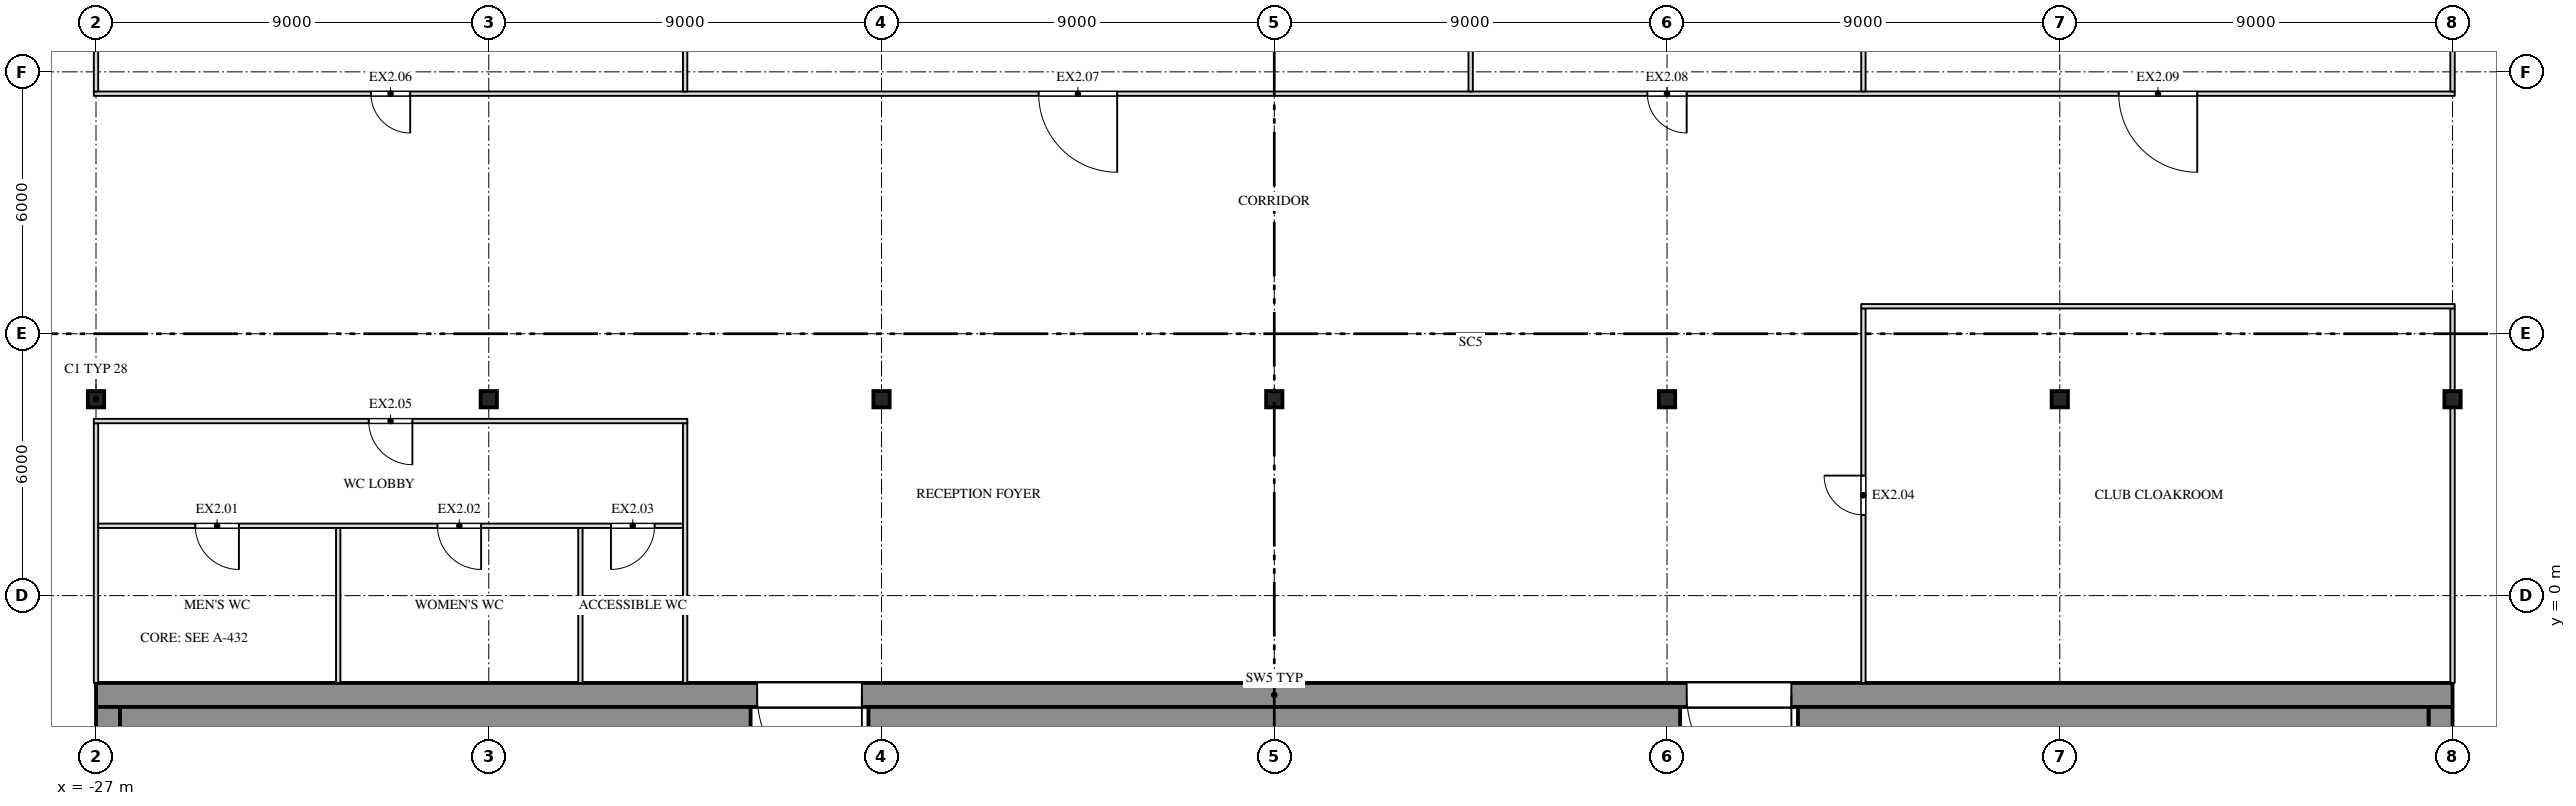
"""IFC4 building model, lengths in metres.
Left out: names, types, materials, properties, quantities, classifications, styles, units other than length and angle.
Written with IfcOpenShell. Run it as: python <this file> out.ifc"""

import sys

from ifc_helpers import new_model, si_unit, direction, frame, frame_2d, origin, origin_2d, place, context, subcontext, project, spatial, rectangle, i_section, extrude, element, fill, save


model = new_model("IFC4")
c1 = context("Model", 3, precision=1e-05, world=origin(), true_north=direction((0.0, 1.0)))
c2 = subcontext(c1, "Body", "Model", "MODEL_VIEW")
j1 = project(units=[si_unit("LENGTHUNIT", "METRE"), si_unit("PLANEANGLEUNIT", "RADIAN")], contexts=[c1])
p1 = place(None, origin())
s1 = spatial("IfcSite", under=j1, at=p1, CompositionType="ELEMENT")
p2 = place(p1, origin())
s2 = spatial("IfcBuilding", under=s1, at=p2, CompositionType="ELEMENT")
p3 = place(p2, frame((0.0, 0.0, 276.5)))
s3 = spatial("IfcBuildingStorey", under=s2, at=p3, CompositionType="ELEMENT", Elevation=276.5)
for number, where, z_axis, x_axis in (
    (1, (-27.0, 4.5, 0.0), (0.0, 0.0, 1.0), (1.0, 0.0, 0.0)),
    (2, (-18.0, 4.5, 0.0), (0.0, 0.0, 1.0), (1.0, 0.0, 0.0)),
    (3, (-9.0, 4.5, 0.0), (0.0, 0.0, 1.0), (1.0, 0.0, 0.0)),
    (4, (0.0, 4.5, 0.0), (0.0, 0.0, 1.0), (1.0, 0.0, 0.0)),
    (5, (9.0, 4.5, 0.0), (0.0, 0.0, 1.0), (1.0, 0.0, 0.0)),
    (6, (18.0, 4.5, 0.0), (0.0, 0.0, 1.0), (1.0, 0.0, 0.0)),
    (7, (27.0, 4.5, 0.0), (0.0, 0.0, 1.0), (1.0, 0.0, 0.0)),
):
    element("IfcColumn", number, at=place(p3, frame(where, z_axis=z_axis, x_axis=x_axis)), inside=s3, PredefinedType="COLUMN", context=c2, shape_type="SweptSolid", body=[
        extrude(i_section(OverallWidth=0.373, OverallDepth=0.373, WebThickness=0.016, FlangeThickness=0.026, at=origin_2d()), origin(), (0.0, 0.0, 1.0), 4.0),
    ])
p4 = place(p3, frame((-27.0, -2.275, 0.0), z_axis=(0.0, 0.0, 1.0), x_axis=(1.0, 0.0, 0.0)))
e8 = element("IfcWall", 8, at=p4, inside=s3, PredefinedType="SHEAR", context=c2, shape_type="SweptSolid", body=[
    extrude(rectangle(XDim=54.0, YDim=0.55, at=frame_2d((27.0, 0.0))), origin(), (0.0, 0.0, 1.0), 3.78),
])
p5 = place(p4, frame((15.15, 0.0, 0.0)))
e9 = element("IfcOpeningElement", 9, at=p5, cuts=e8, PredefinedType="OPENING", context=c2, shape_type="SweptSolid", body=[
    extrude(rectangle(XDim=2.4, YDim=2.1, at=frame_2d((1.2, 1.05))), frame((0.0, 0.287, 0.0), z_axis=(0.0, -1.0, 0.0), x_axis=(1.0, 0.0, 0.0)), (0.0, 0.0, 1.0), 0.574),
])
p6 = place(p4, frame((36.45, 0.0, 0.0)))
e10 = element("IfcOpeningElement", 10, at=p6, cuts=e8, PredefinedType="OPENING", context=c2, shape_type="SweptSolid", body=[
    extrude(rectangle(XDim=2.4, YDim=2.1, at=frame_2d((1.2, 1.05))), frame((0.0, 0.287, 0.0), z_axis=(0.0, -1.0, 0.0), x_axis=(1.0, 0.0, 0.0)), (0.0, 0.0, 1.0), 0.574),
])
p7 = place(p3, frame((-26.725, -13.45, 0.0), z_axis=(0.0, 0.0, 1.0), x_axis=(0.0, 1.0, 0.0)))
e11 = element("IfcWall", 11, at=p7, inside=s3, PredefinedType="SHEAR", context=c2, shape_type="SweptSolid", body=[
    extrude(rectangle(XDim=10.9, YDim=0.55, at=frame_2d((5.45, 0.0))), origin(), (0.0, 0.0, 1.0), 3.78),
])
p8 = place(p7, frame((4.662, 0.0, 0.0)))
e12 = element("IfcOpeningElement", 12, at=p8, cuts=e11, PredefinedType="OPENING", context=c2, shape_type="SweptSolid", body=[
    extrude(rectangle(XDim=2.4, YDim=2.1, at=frame_2d((1.2, 1.05))), frame((0.0, 0.287, 0.0), z_axis=(0.0, -1.0, 0.0), x_axis=(1.0, 0.0, 0.0)), (0.0, 0.0, 1.0), 0.574),
])
p9 = place(p3, frame((26.725, -13.45, 0.0), z_axis=(0.0, 0.0, 1.0), x_axis=(0.0, 1.0, 0.0)))
e13 = element("IfcWall", 13, at=p9, inside=s3, PredefinedType="SHEAR", context=c2, shape_type="SweptSolid", body=[
    extrude(rectangle(XDim=10.9, YDim=0.55, at=frame_2d((5.45, 0.0))), origin(), (0.0, 0.0, 1.0), 3.78),
])
p10 = place(p9, frame((4.662, 0.0, 0.0)))
e14 = element("IfcOpeningElement", 14, at=p10, cuts=e13, PredefinedType="OPENING", context=c2, shape_type="SweptSolid", body=[
    extrude(rectangle(XDim=2.4, YDim=2.1, at=frame_2d((1.2, 1.05))), frame((0.0, 0.287, 0.0), z_axis=(0.0, -1.0, 0.0), x_axis=(1.0, 0.0, 0.0)), (0.0, 0.0, 1.0), 0.574),
])
p11 = place(p3, frame((-26.45, -2.875, 0.0), z_axis=(0.0, 0.0, 1.0), x_axis=(1.0, 0.0, 0.0)))
e15 = element("IfcWall", 15, at=p11, inside=s3, PredefinedType="SHEAR", context=c2, shape_type="SweptSolid", body=[
    extrude(rectangle(XDim=14.45, YDim=0.65, at=frame_2d((7.225, 0.0))), origin(), (0.0, 0.0, 1.0), 3.78),
])
p12 = place(p3, frame((-9.3, -2.875, 0.0), z_axis=(0.0, 0.0, 1.0), x_axis=(1.0, 0.0, 0.0)))
e16 = element("IfcWall", 16, at=p12, inside=s3, PredefinedType="SHEAR", context=c2, shape_type="SweptSolid", body=[
    extrude(rectangle(XDim=18.6, YDim=0.65, at=frame_2d((9.3, 0.0))), origin(), (0.0, 0.0, 1.0), 3.78),
])
p13 = place(p3, frame((12.0, -2.875, 0.0), z_axis=(0.0, 0.0, 1.0), x_axis=(1.0, 0.0, 0.0)))
e17 = element("IfcWall", 17, at=p13, inside=s3, PredefinedType="SHEAR", context=c2, shape_type="SweptSolid", body=[
    extrude(rectangle(XDim=14.45, YDim=0.65, at=frame_2d((7.225, 0.0))), origin(), (0.0, 0.0, 1.0), 3.78),
])
p14 = place(p3, frame((-27.0, -2.0, 0.0), z_axis=(0.0, 0.0, 1.0), x_axis=(0.0, 1.0, 0.0)))
e18 = element("IfcWall", 18, at=p14, inside=s3, PredefinedType="PARTITIONING", context=c2, shape_type="SweptSolid", body=[
    extrude(rectangle(XDim=5.95, YDim=0.1, at=frame_2d((2.975, 0.0))), origin(), (0.0, 0.0, 1.0), 3.247),
])
for number, where, z_axis, x_axis in (
    (19, (-21.45, -2.0, 0.0), (0.0, 0.0, 1.0), (0.0, 1.0, 0.0)),
    (20, (-15.9, -2.0, 0.0), (0.0, 0.0, 1.0), (0.0, 1.0, 0.0)),
):
    element("IfcWall", number, at=place(p3, frame(where, z_axis=z_axis, x_axis=x_axis)), inside=s3, PredefinedType="PARTITIONING", context=c2, shape_type="SweptSolid", body=[
        extrude(rectangle(XDim=3.55, YDim=0.1, at=frame_2d((1.775, 0.0))), origin(), (0.0, 0.0, 1.0), 3.78),
    ])
p15 = place(p3, frame((-13.5, -2.0, 0.0), z_axis=(0.0, 0.0, 1.0), x_axis=(0.0, 1.0, 0.0)))
e21 = element("IfcWall", 21, at=p15, inside=s3, PredefinedType="PARTITIONING", context=c2, shape_type="SweptSolid", body=[
    extrude(rectangle(XDim=5.95, YDim=0.1, at=frame_2d((2.975, 0.0))), origin(), (0.0, 0.0, 1.0), 3.247),
])
p16 = place(p3, frame((13.5, -2.0, 0.0), z_axis=(0.0, 0.0, 1.0), x_axis=(0.0, 1.0, 0.0)))
e22 = element("IfcWall", 22, at=p16, inside=s3, PredefinedType="PARTITIONING", context=c2, shape_type="SweptSolid", body=[
    extrude(rectangle(XDim=8.58, YDim=0.1, at=frame_2d((4.29, 0.0))), origin(), (0.0, 0.0, 1.0), 3.247),
])
p17 = place(p16, frame((3.85, 0.0, 0.0)))
e23 = element("IfcOpeningElement", 23, at=p17, cuts=e22, PredefinedType="OPENING", context=c2, shape_type="SweptSolid", body=[
    extrude(rectangle(XDim=0.9, YDim=2.1, at=frame_2d((0.45, 1.05))), frame((0.0, 0.062, 0.0), z_axis=(0.0, -1.0, 0.0), x_axis=(1.0, 0.0, 0.0)), (0.0, 0.0, 1.0), 0.124),
])
p18 = place(p3, frame((27.0, -2.0, 0.0), z_axis=(0.0, 0.0, 1.0), x_axis=(0.0, 1.0, 0.0)))
e24 = element("IfcWall", 24, at=p18, inside=s3, PredefinedType="PARTITIONING", context=c2, shape_type="SweptSolid", body=[
    extrude(rectangle(XDim=6.313, YDim=0.1, at=frame_2d((3.157, 0.0))), origin(), (0.0, 0.0, 1.0), 3.247),
])
p19 = place(p3, frame((27.0, 4.687, 0.0), z_axis=(0.0, 0.0, 1.0), x_axis=(0.0, 1.0, 0.0)))
e25 = element("IfcWall", 25, at=p19, inside=s3, PredefinedType="PARTITIONING", context=c2, shape_type="SweptSolid", body=[
    extrude(rectangle(XDim=1.893, YDim=0.1, at=frame_2d((0.947, 0.0))), origin(), (0.0, 0.0, 1.0), 3.247),
])
p20 = place(p3, frame((-26.95, 1.6, 0.0), z_axis=(0.0, 0.0, 1.0), x_axis=(1.0, 0.0, 0.0)))
e26 = element("IfcWall", 26, at=p20, inside=s3, PredefinedType="PARTITIONING", context=c2, shape_type="SweptSolid", body=[
    extrude(rectangle(XDim=13.4, YDim=0.1, at=frame_2d((6.7, 0.0))), origin(), (0.0, 0.0, 1.0), 3.78),
])
p21 = place(p20, frame((2.225, 0.0, 0.0)))
e27 = element("IfcOpeningElement", 27, at=p21, cuts=e26, PredefinedType="OPENING", context=c2, shape_type="SweptSolid", body=[
    extrude(rectangle(XDim=1.0, YDim=2.1, at=frame_2d((0.5, 1.05))), frame((0.0, 0.062, 0.0), z_axis=(0.0, -1.0, 0.0), x_axis=(1.0, 0.0, 0.0)), (0.0, 0.0, 1.0), 0.124),
])
p22 = place(p20, frame((7.775, 0.0, 0.0)))
e28 = element("IfcOpeningElement", 28, at=p22, cuts=e26, PredefinedType="OPENING", context=c2, shape_type="SweptSolid", body=[
    extrude(rectangle(XDim=1.0, YDim=2.1, at=frame_2d((0.5, 1.05))), frame((0.0, 0.062, 0.0), z_axis=(0.0, -1.0, 0.0), x_axis=(1.0, 0.0, 0.0)), (0.0, 0.0, 1.0), 0.124),
])
p23 = place(p20, frame((11.75, 0.0, 0.0)))
e29 = element("IfcOpeningElement", 29, at=p23, cuts=e26, PredefinedType="OPENING", context=c2, shape_type="SweptSolid", body=[
    extrude(rectangle(XDim=1.0, YDim=2.1, at=frame_2d((0.5, 1.05))), frame((0.0, 0.062, 0.0), z_axis=(0.0, -1.0, 0.0), x_axis=(1.0, 0.0, 0.0)), (0.0, 0.0, 1.0), 0.124),
])
p24 = place(p3, frame((-27.05, 4.0, 0.0), z_axis=(0.0, 0.0, 1.0), x_axis=(1.0, 0.0, 0.0)))
e30 = element("IfcWall", 30, at=p24, inside=s3, PredefinedType="PARTITIONING", context=c2, shape_type="SweptSolid", body=[
    extrude(rectangle(XDim=13.6, YDim=0.1, at=frame_2d((6.8, 0.0))), origin(), (0.0, 0.0, 1.0), 3.78),
])
p25 = place(p24, frame((6.3, 0.0, 0.0)))
e31 = element("IfcOpeningElement", 31, at=p25, cuts=e30, PredefinedType="OPENING", context=c2, shape_type="SweptSolid", body=[
    extrude(rectangle(XDim=1.0, YDim=2.1, at=frame_2d((0.5, 1.05))), frame((0.0, 0.062, 0.0), z_axis=(0.0, -1.0, 0.0), x_axis=(1.0, 0.0, 0.0)), (0.0, 0.0, 1.0), 0.124),
])
p26 = place(p3, frame((13.45, 6.63, 0.0), z_axis=(0.0, 0.0, 1.0), x_axis=(1.0, 0.0, 0.0)))
e32 = element("IfcWall", 32, at=p26, inside=s3, PredefinedType="PARTITIONING", context=c2, shape_type="SweptSolid", body=[
    extrude(rectangle(XDim=13.6, YDim=0.1, at=frame_2d((6.8, 0.0))), origin(), (0.0, 0.0, 1.0), 3.78),
])
p27 = place(p3, frame((-27.05, 11.5, 0.0), z_axis=(0.0, 0.0, 1.0), x_axis=(1.0, 0.0, 0.0)))
e33 = element("IfcWall", 33, at=p27, inside=s3, PredefinedType="PARTITIONING", context=c2, shape_type="SweptSolid", body=[
    extrude(rectangle(XDim=54.1, YDim=0.1, at=frame_2d((27.05, 0.0))), origin(), (0.0, 0.0, 1.0), 3.78),
])
p28 = place(p27, frame((6.35, 0.0, 0.0)))
e34 = element("IfcOpeningElement", 34, at=p28, cuts=e33, PredefinedType="OPENING", context=c2, shape_type="SweptSolid", body=[
    extrude(rectangle(XDim=0.9, YDim=2.1, at=frame_2d((0.45, 1.05))), frame((0.0, 0.062, 0.0), z_axis=(0.0, -1.0, 0.0), x_axis=(1.0, 0.0, 0.0)), (0.0, 0.0, 1.0), 0.124),
])
p29 = place(p27, frame((21.65, 0.0, 0.0)))
e35 = element("IfcOpeningElement", 35, at=p29, cuts=e33, PredefinedType="OPENING", context=c2, shape_type="SweptSolid", body=[
    extrude(rectangle(XDim=1.8, YDim=2.1, at=frame_2d((0.9, 1.05))), frame((0.0, 0.062, 0.0), z_axis=(0.0, -1.0, 0.0), x_axis=(1.0, 0.0, 0.0)), (0.0, 0.0, 1.0), 0.124),
])
p30 = place(p27, frame((35.6, 0.0, 0.0)))
e36 = element("IfcOpeningElement", 36, at=p30, cuts=e33, PredefinedType="OPENING", context=c2, shape_type="SweptSolid", body=[
    extrude(rectangle(XDim=0.9, YDim=2.1, at=frame_2d((0.45, 1.05))), frame((0.0, 0.062, 0.0), z_axis=(0.0, -1.0, 0.0), x_axis=(1.0, 0.0, 0.0)), (0.0, 0.0, 1.0), 0.124),
])
p31 = place(p27, frame((46.4, 0.0, 0.0)))
e37 = element("IfcOpeningElement", 37, at=p31, cuts=e33, PredefinedType="OPENING", context=c2, shape_type="SweptSolid", body=[
    extrude(rectangle(XDim=1.8, YDim=2.1, at=frame_2d((0.9, 1.05))), frame((0.0, 0.062, 0.0), z_axis=(0.0, -1.0, 0.0), x_axis=(1.0, 0.0, 0.0)), (0.0, 0.0, 1.0), 0.124),
])
p32 = place(p3, frame((-27.0, 11.55, 0.0), z_axis=(0.0, 0.0, 1.0), x_axis=(0.0, 1.0, 0.0)))
e38 = element("IfcWall", 38, at=p32, inside=s3, PredefinedType="PARTITIONING", context=c2, shape_type="SweptSolid", body=[
    extrude(rectangle(XDim=2.263, YDim=0.1, at=frame_2d((1.132, 0.0))), origin(), (0.0, 0.0, 1.0), 3.247),
])
p33 = place(p3, frame((-13.5, 11.55, 0.0), z_axis=(0.0, 0.0, 1.0), x_axis=(0.0, 1.0, 0.0)))
e39 = element("IfcWall", 39, at=p33, inside=s3, PredefinedType="PARTITIONING", context=c2, shape_type="SweptSolid", body=[
    extrude(rectangle(XDim=9.64, YDim=0.1, at=frame_2d((4.82, 0.0))), origin(), (0.0, 0.0, 1.0), 3.247),
])
p34 = place(p33, frame((4.4, 0.0, 0.0)))
e40 = element("IfcOpeningElement", 40, at=p34, cuts=e39, PredefinedType="OPENING", context=c2, shape_type="SweptSolid", body=[
    extrude(rectangle(XDim=0.8, YDim=2.1, at=frame_2d((0.4, 1.05))), frame((0.0, 0.062, 0.0), z_axis=(0.0, -1.0, 0.0), x_axis=(1.0, 0.0, 0.0)), (0.0, 0.0, 1.0), 0.124),
])
for number, where, z_axis, x_axis in (
    (41, (4.5, 11.55, 0.0), (0.0, 0.0, 1.0), (0.0, 1.0, 0.0)),
    (42, (13.5, 11.55, 0.0), (0.0, 0.0, 1.0), (0.0, 1.0, 0.0)),
):
    element("IfcWall", number, at=place(p3, frame(where, z_axis=z_axis, x_axis=x_axis)), inside=s3, PredefinedType="PARTITIONING", context=c2, shape_type="SweptSolid", body=[
        extrude(rectangle(XDim=9.64, YDim=0.1, at=frame_2d((4.82, 0.0))), origin(), (0.0, 0.0, 1.0), 3.247),
    ])
p35 = place(p3, frame((27.0, 11.55, 0.0), z_axis=(0.0, 0.0, 1.0), x_axis=(0.0, 1.0, 0.0)))
e43 = element("IfcWall", 43, at=p35, inside=s3, PredefinedType="PARTITIONING", context=c2, shape_type="SweptSolid", body=[
    extrude(rectangle(XDim=2.263, YDim=0.1, at=frame_2d((1.132, 0.0))), origin(), (0.0, 0.0, 1.0), 3.247),
])
p36 = place(p21, origin())
e44 = element("IfcDoor", 44, at=p36, inside=s3, OperationType="SINGLE_SWING_LEFT", PredefinedType="DOOR", context=c2, shape_type="SweptSolid", body=[
    extrude(rectangle(XDim=1.0, YDim=2.1, at=frame_2d((0.5, 1.05))), frame((0.0, 0.025, 0.0), z_axis=(0.0, -1.0, 0.0), x_axis=(1.0, 0.0, 0.0)), (0.0, 0.0, 1.0), 0.05),
])
fill(e27, e44)
p37 = place(p22, origin())
e45 = element("IfcDoor", 45, at=p37, inside=s3, OperationType="SINGLE_SWING_LEFT", PredefinedType="DOOR", context=c2, shape_type="SweptSolid", body=[
    extrude(rectangle(XDim=1.0, YDim=2.1, at=frame_2d((0.5, 1.05))), frame((0.0, 0.025, 0.0), z_axis=(0.0, -1.0, 0.0), x_axis=(1.0, 0.0, 0.0)), (0.0, 0.0, 1.0), 0.05),
])
fill(e28, e45)
p38 = place(p23, origin())
e46 = element("IfcDoor", 46, at=p38, inside=s3, OperationType="SINGLE_SWING_RIGHT", PredefinedType="DOOR", context=c2, shape_type="SweptSolid", body=[
    extrude(rectangle(XDim=1.0, YDim=2.1, at=frame_2d((0.5, 1.05))), frame((0.0, 0.025, 0.0), z_axis=(0.0, -1.0, 0.0), x_axis=(1.0, 0.0, 0.0)), (0.0, 0.0, 1.0), 0.05),
])
fill(e29, e46)
p39 = place(p17, origin())
e47 = element("IfcDoor", 47, at=p39, inside=s3, OperationType="SINGLE_SWING_RIGHT", PredefinedType="DOOR", context=c2, shape_type="SweptSolid", body=[
    extrude(rectangle(XDim=0.9, YDim=2.1, at=frame_2d((0.45, 1.05))), frame((0.0, 0.025, 0.0), z_axis=(0.0, -1.0, 0.0), x_axis=(1.0, 0.0, 0.0)), (0.0, 0.0, 1.0), 0.05),
])
fill(e23, e47)
p40 = place(p25, origin())
e48 = element("IfcDoor", 48, at=p40, inside=s3, OperationType="SINGLE_SWING_LEFT", PredefinedType="DOOR", context=c2, shape_type="SweptSolid", body=[
    extrude(rectangle(XDim=1.0, YDim=2.1, at=frame_2d((0.5, 1.05))), frame((0.0, 0.025, 0.0), z_axis=(0.0, -1.0, 0.0), x_axis=(1.0, 0.0, 0.0)), (0.0, 0.0, 1.0), 0.05),
])
fill(e31, e48)
p41 = place(p28, origin())
e49 = element("IfcDoor", 49, at=p41, inside=s3, OperationType="SINGLE_SWING_LEFT", PredefinedType="DOOR", context=c2, shape_type="SweptSolid", body=[
    extrude(rectangle(XDim=0.9, YDim=2.1, at=frame_2d((0.45, 1.05))), frame((0.0, 0.025, 0.0), z_axis=(0.0, -1.0, 0.0), x_axis=(1.0, 0.0, 0.0)), (0.0, 0.0, 1.0), 0.05),
])
fill(e34, e49)
p42 = place(p29, origin())
e50 = element("IfcDoor", 50, at=p42, inside=s3, OperationType="DOUBLE_DOOR_SINGLE_SWING", PredefinedType="DOOR", context=c2, shape_type="SweptSolid", body=[
    extrude(rectangle(XDim=1.8, YDim=2.1, at=frame_2d((0.9, 1.05))), frame((0.0, 0.025, 0.0), z_axis=(0.0, -1.0, 0.0), x_axis=(1.0, 0.0, 0.0)), (0.0, 0.0, 1.0), 0.05),
])
fill(e35, e50)
p43 = place(p30, origin())
e51 = element("IfcDoor", 51, at=p43, inside=s3, OperationType="SINGLE_SWING_LEFT", PredefinedType="DOOR", context=c2, shape_type="SweptSolid", body=[
    extrude(rectangle(XDim=0.9, YDim=2.1, at=frame_2d((0.45, 1.05))), frame((0.0, 0.025, 0.0), z_axis=(0.0, -1.0, 0.0), x_axis=(1.0, 0.0, 0.0)), (0.0, 0.0, 1.0), 0.05),
])
fill(e36, e51)
p44 = place(p31, origin())
e52 = element("IfcDoor", 52, at=p44, inside=s3, OperationType="DOUBLE_DOOR_SINGLE_SWING", PredefinedType="DOOR", context=c2, shape_type="SweptSolid", body=[
    extrude(rectangle(XDim=1.8, YDim=2.1, at=frame_2d((0.9, 1.05))), frame((0.0, 0.025, 0.0), z_axis=(0.0, -1.0, 0.0), x_axis=(1.0, 0.0, 0.0)), (0.0, 0.0, 1.0), 0.05),
])
fill(e37, e52)
p45 = place(p5, origin())
e53 = element("IfcDoor", 53, at=p45, inside=s3, OperationType="DOUBLE_DOOR_SINGLE_SWING", PredefinedType="DOOR", context=c2, shape_type="SweptSolid", body=[
    extrude(rectangle(XDim=2.4, YDim=2.1, at=frame_2d((1.2, 1.05))), frame((0.0, 0.025, 0.0), z_axis=(0.0, -1.0, 0.0), x_axis=(1.0, 0.0, 0.0)), (0.0, 0.0, 1.0), 0.05),
])
fill(e9, e53)
p46 = place(p6, origin())
e54 = element("IfcDoor", 54, at=p46, inside=s3, OperationType="DOUBLE_DOOR_SINGLE_SWING", PredefinedType="DOOR", context=c2, shape_type="SweptSolid", body=[
    extrude(rectangle(XDim=2.4, YDim=2.1, at=frame_2d((1.2, 1.05))), frame((0.0, 0.025, 0.0), z_axis=(0.0, -1.0, 0.0), x_axis=(1.0, 0.0, 0.0)), (0.0, 0.0, 1.0), 0.05),
])
fill(e10, e54)
save(model, sys.argv[1])
